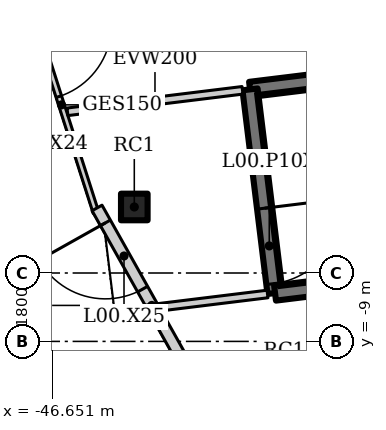
"""IFC4 building model, lengths in metres.
Left out: names, types, materials, properties, quantities, classifications, styles, units other than length and angle.
Written with IfcOpenShell. Run it as: python <this file> out.ifc"""

import sys

from ifc_helpers import new_model, si_unit, direction, frame, frame_2d, origin, origin_2d, place, context, subcontext, project, spatial, rectangle, hollow_rectangle, extrude, element, fill, save


model = new_model("IFC4")
c1 = context("Model", 3, precision=1e-05, world=origin(), true_north=direction((0.0, 1.0)))
c2 = subcontext(c1, "Body", "Model", "MODEL_VIEW")
j1 = project(units=[si_unit("LENGTHUNIT", "METRE"), si_unit("PLANEANGLEUNIT", "RADIAN")], contexts=[c1])
p1 = place(None, origin())
s1 = spatial("IfcSite", under=j1, at=p1, CompositionType="ELEMENT")
p2 = place(p1, origin())
s2 = spatial("IfcBuilding", under=s1, at=p2, CompositionType="ELEMENT")
p3 = place(p2, origin())
s3 = spatial("IfcBuildingStorey", under=s2, at=p3, CompositionType="ELEMENT", Elevation=0.0)
p4 = place(p3, frame((-44.489, -5.462, 0.0), z_axis=(0.0, 0.0, 1.0), x_axis=(1.0, 0.0, 0.0)))
e1 = element("IfcColumn", 1, at=p4, inside=s3, PredefinedType="COLUMN", context=c2, shape_type="SweptSolid", body=[
    extrude(hollow_rectangle(XDim=0.7, YDim=0.7, WallThickness=0.04, at=origin_2d()), origin(), (0.0, 0.0, 1.0), 6.5),
])
p5 = place(p3, frame((-47.313, 0.061, 0.0), z_axis=(0.0, 0.0, 1.0), x_axis=(0.304942287358, -0.952370831862, 0.0)))
e2 = element("IfcWall", 2, at=p5, inside=s3, PredefinedType="ELEMENTEDWALL", context=c2, shape_type="SweptSolid", body=[
    extrude(rectangle(XDim=5.957, YDim=0.15, at=frame_2d((2.978, 0.0))), origin(), (0.0, 0.0, 1.0), 6.3),
])
p6 = place(p5, frame((0.75, 0.0, 0.0)))
e3 = element("IfcOpeningElement", 3, at=p6, cuts=e2, PredefinedType="OPENING", context=c2, shape_type="SweptSolid", body=[
    extrude(rectangle(XDim=2.0, YDim=2.4, at=frame_2d((1.0, 1.2))), frame((0.0, 0.085, 0.0), z_axis=(0.0, -1.0, 0.0), x_axis=(1.0, 0.0, 0.0)), (0.0, 0.0, 1.0), 0.17),
])
p7 = place(p3, frame((-45.469, -5.488, 0.0), z_axis=(0.0, 0.0, 1.0), x_axis=(0.489563544979, -0.871967622924, 0.0)))
e4 = element("IfcWall", 4, at=p7, inside=s3, PredefinedType="SOLIDWALL", context=c2, shape_type="SweptSolid", body=[
    extrude(rectangle(XDim=5.883, YDim=0.3, at=frame_2d((2.941, 0.0))), origin(), (0.0, 0.0, 1.0), 6.3),
])
p8 = place(p7, frame((0.45, 0.0, 0.0)))
e5 = element("IfcOpeningElement", 5, at=p8, cuts=e4, PredefinedType="OPENING", context=c2, shape_type="SweptSolid", body=[
    extrude(rectangle(XDim=2.0, YDim=2.1, at=frame_2d((1.0, 1.05))), frame((0.0, 0.16, 0.0), z_axis=(0.0, -1.0, 0.0), x_axis=(1.0, 0.0, 0.0)), (0.0, 0.0, 1.0), 0.32),
])
p9 = place(p3, frame((-41.642, -2.393, 0.0), z_axis=(0.0, 0.0, 1.0), x_axis=(-0.992541109885, -0.121910398198, 0.0)))
e6 = element("IfcWall", 6, at=p9, inside=s3, PredefinedType="SOLIDWALL", context=c2, shape_type="SweptSolid", body=[
    extrude(rectangle(XDim=4.64, YDim=0.2, at=frame_2d((2.32, 0.0))), origin(), (0.0, 0.0, 1.0), 6.3),
])
p10 = place(p3, frame((-40.983, -7.752, 0.0), z_axis=(0.0, 0.0, 1.0), x_axis=(-0.992543583225, -0.121890259659, 0.0)))
e7 = element("IfcWall", 7, at=p10, inside=s3, PredefinedType="SOLIDWALL", context=c2, shape_type="SweptSolid", body=[
    extrude(rectangle(XDim=4.05, YDim=0.2, at=frame_2d((2.025, 0.0))), origin(), (0.0, 0.0, 1.0), 6.3),
])
p11 = place(p3, frame((-32.708, -1.296, 0.0), z_axis=(0.0, 0.0, 1.0), x_axis=(-0.992545692684, -0.121873081252, 0.0)))
e8 = element("IfcWall", 8, at=p11, inside=s3, PredefinedType="SHEAR", context=c2, shape_type="SweptSolid", body=[
    extrude(rectangle(XDim=8.8, YDim=0.4, at=frame_2d((4.4, 0.0))), origin(), (0.0, 0.0, 1.0), 6.5),
])
p12 = place(p3, frame((-41.443, -2.368, 0.0), z_axis=(0.0, 0.0, 1.0), x_axis=(0.121892082937, -0.992543359314, 0.0)))
e9 = element("IfcWall", 9, at=p12, inside=s3, PredefinedType="SHEAR", context=c2, shape_type="SweptSolid", body=[
    extrude(rectangle(XDim=5.4, YDim=0.4, at=frame_2d((2.7, 0.0))), origin(), (0.0, 0.0, 1.0), 6.5),
])
p13 = place(p12, frame((3.15, 0.0, 0.0)))
e10 = element("IfcOpeningElement", 10, at=p13, cuts=e9, PredefinedType="OPENING", context=c2, shape_type="SweptSolid", body=[
    extrude(rectangle(XDim=2.0, YDim=2.1, at=frame_2d((1.0, 1.05))), frame((0.0, 0.21, 0.0), z_axis=(0.0, -1.0, 0.0), x_axis=(1.0, 0.0, 0.0)), (0.0, 0.0, 1.0), 0.42),
])
p14 = place(p3, frame((-40.785, -7.728, 0.0), z_axis=(0.0, 0.0, 1.0), x_axis=(0.992545280606, 0.121876437212, 0.0)))
e11 = element("IfcWall", 11, at=p14, inside=s3, PredefinedType="SHEAR", context=c2, shape_type="SweptSolid", body=[
    extrude(rectangle(XDim=8.8, YDim=0.4, at=frame_2d((4.4, 0.0))), origin(), (0.0, 0.0, 1.0), 6.5),
])
p15 = place(p6, origin())
e12 = element("IfcDoor", 12, at=p15, inside=s3, OperationType="DOUBLE_DOOR_DOUBLE_SWING", PredefinedType="DOOR", context=c2, shape_type="SweptSolid", body=[
    extrude(rectangle(XDim=2.0, YDim=2.4, at=frame_2d((1.0, 1.2))), frame((0.0, 0.025, 0.0), z_axis=(0.0, -1.0, 0.0), x_axis=(1.0, 0.0, 0.0)), (0.0, 0.0, 1.0), 0.05),
])
fill(e3, e12)
p16 = place(p8, frame((2.0, 0.0, 0.0), z_axis=(0.0, 0.0, 1.0), x_axis=(-1.0, 0.0, 0.0)))
e13 = element("IfcDoor", 13, at=p16, inside=s3, OperationType="DOUBLE_DOOR_SINGLE_SWING", PredefinedType="DOOR", context=c2, shape_type="SweptSolid", body=[
    extrude(rectangle(XDim=2.0, YDim=2.1, at=frame_2d((1.0, 1.05))), frame((0.0, 0.025, 0.0), z_axis=(0.0, -1.0, 0.0), x_axis=(1.0, 0.0, 0.0)), (0.0, 0.0, 1.0), 0.05),
])
fill(e5, e13)
p17 = place(p13, origin())
e14 = element("IfcDoor", 14, at=p17, inside=s3, OperationType="DOUBLE_DOOR_DOUBLE_SWING", PredefinedType="DOOR", context=c2, shape_type="SweptSolid", body=[
    extrude(rectangle(XDim=2.0, YDim=2.1, at=frame_2d((1.0, 1.05))), frame((0.0, 0.025, 0.0), z_axis=(0.0, -1.0, 0.0), x_axis=(1.0, 0.0, 0.0)), (0.0, 0.0, 1.0), 0.05),
])
fill(e10, e14)
save(model, sys.argv[1])
